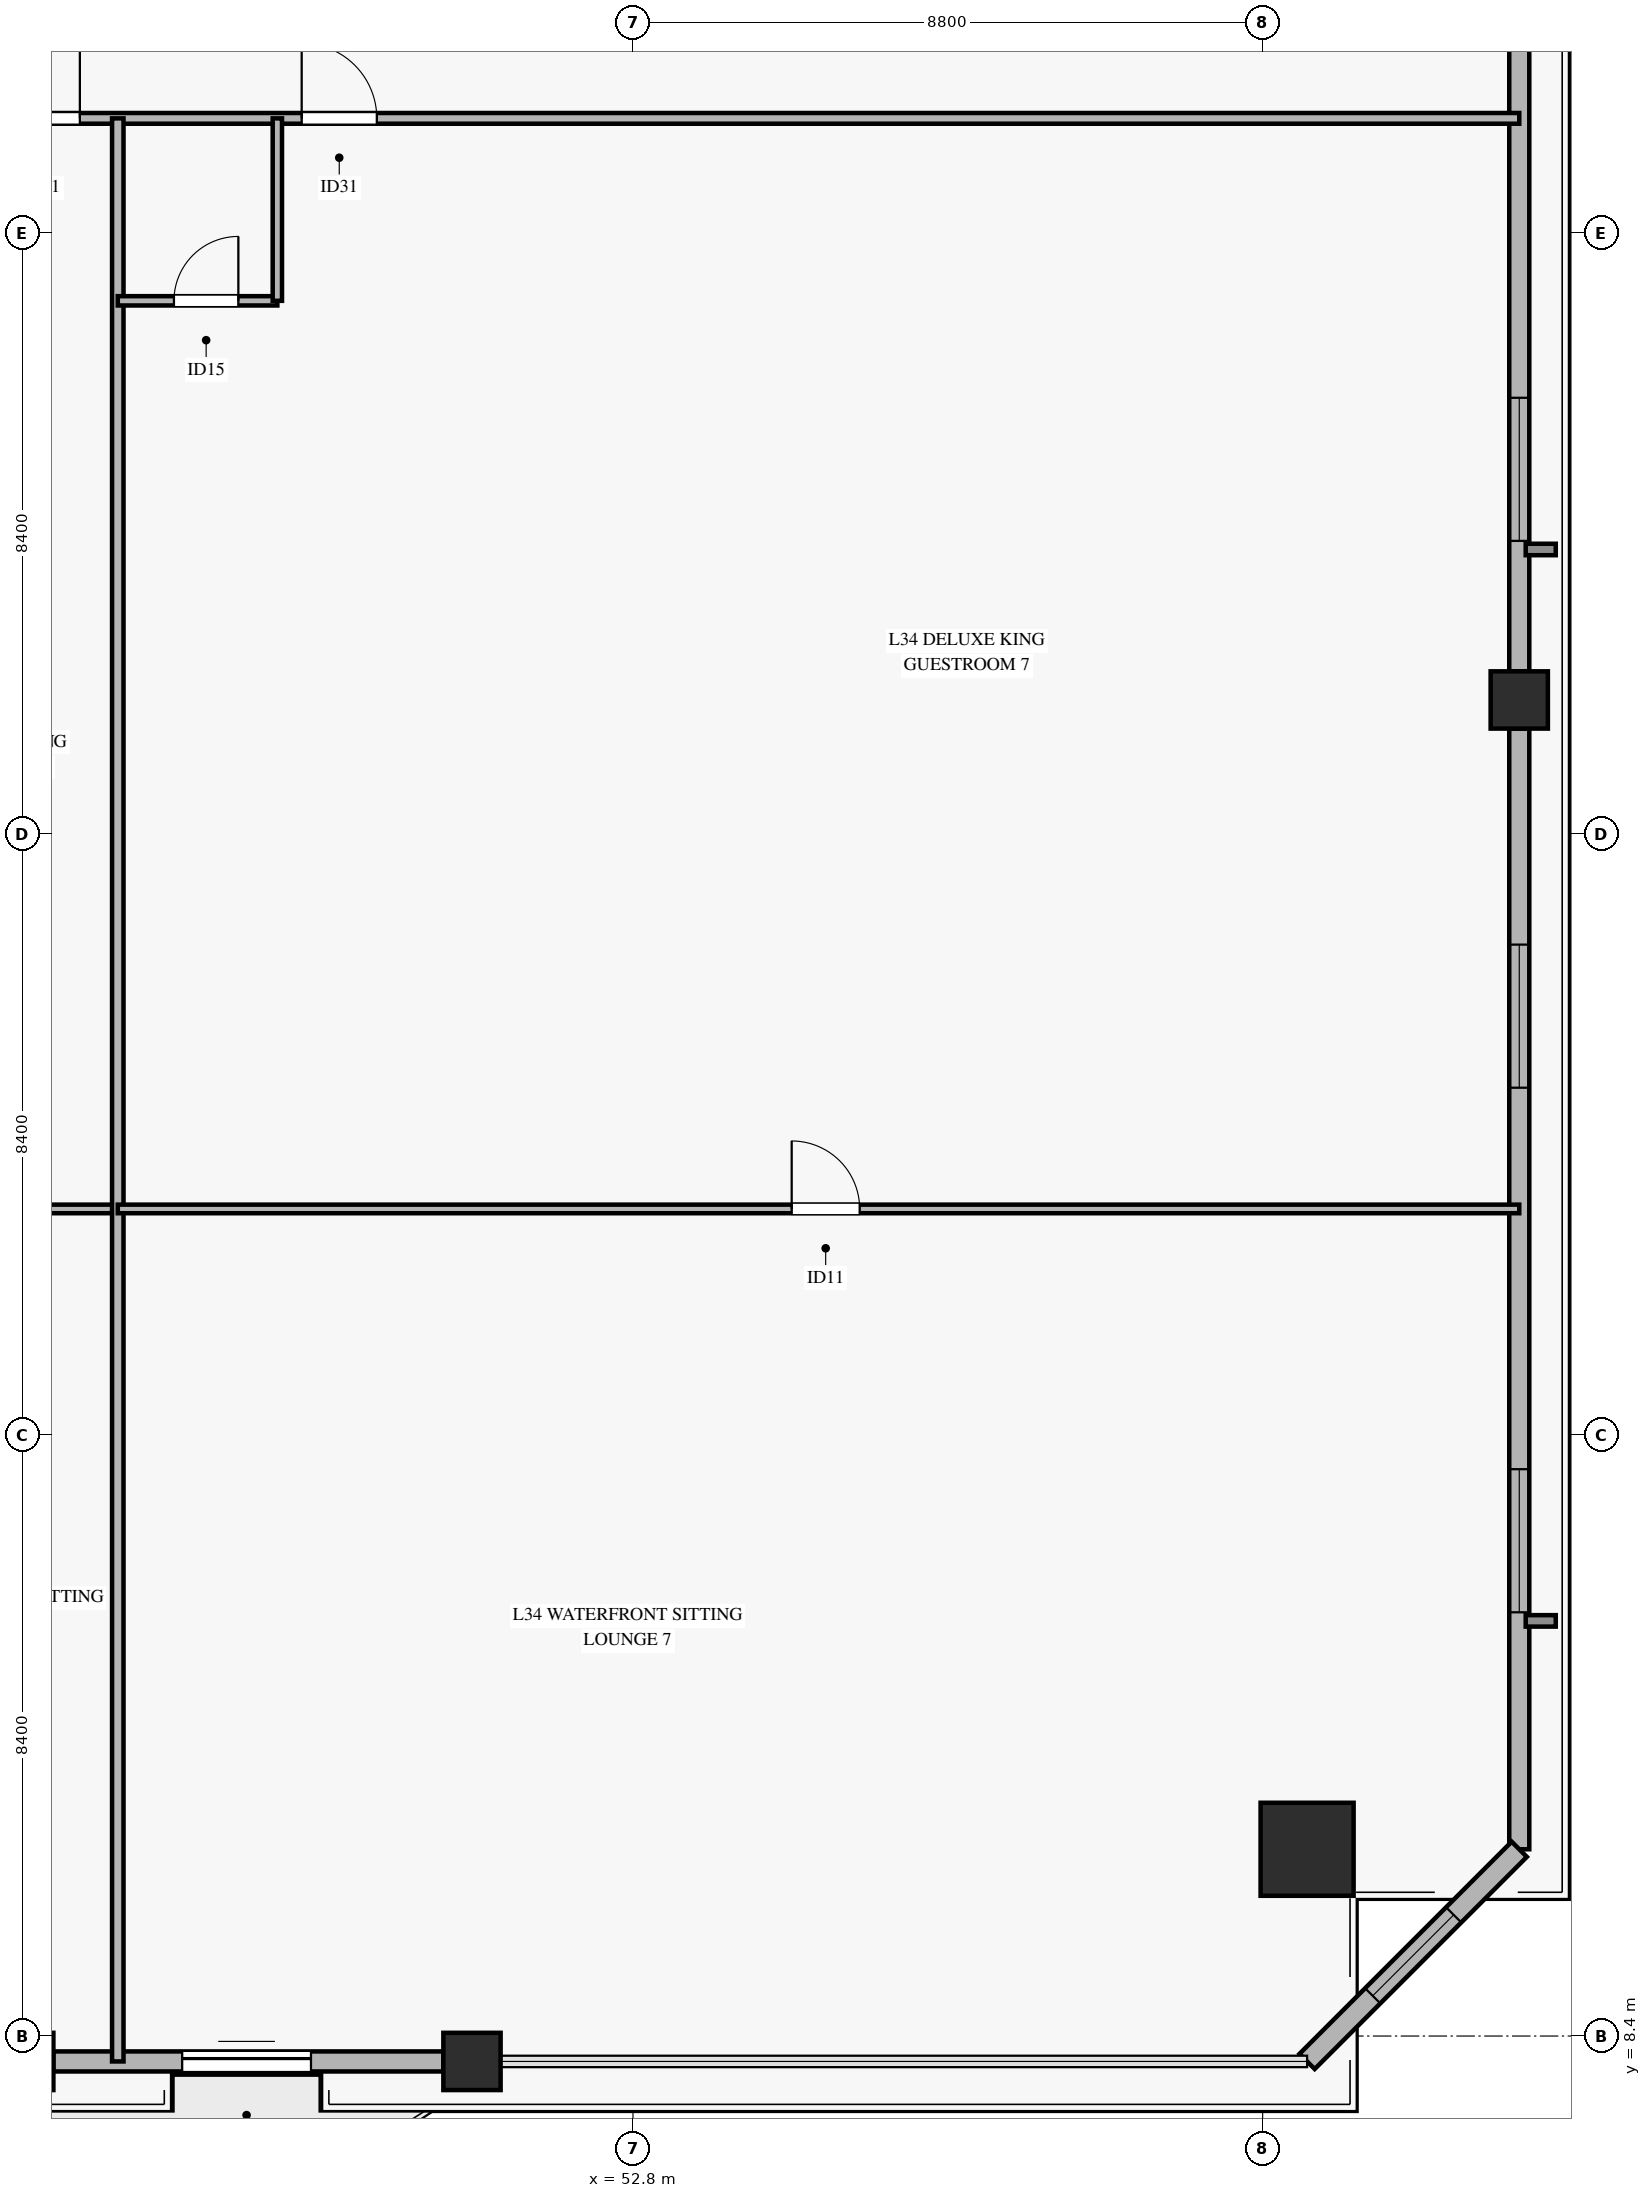
"""IFC4 building model, lengths in metres.
Left out: names, types, materials, properties, quantities, classifications, styles, units other than length and angle.
Written with IfcOpenShell. Run it as: python <this file> out.ifc"""

import sys

from ifc_helpers import new_model, si_unit, direction, frame, frame_2d, origin, origin_2d, place, context, subcontext, project, spatial, rectangle, hollow_rectangle, extrude, source, transform, mapped, element, fill, save


model = new_model("IFC4")
c1 = context("Model", 3, precision=1e-05, world=origin(), true_north=direction((0.0, 1.0)))
c2 = subcontext(c1, "Body", "Model", "MODEL_VIEW")
j1 = project(units=[si_unit("LENGTHUNIT", "METRE"), si_unit("PLANEANGLEUNIT", "RADIAN")], contexts=[c1])
p1 = place(None, origin())
s1 = spatial("IfcSite", under=j1, at=p1, CompositionType="ELEMENT")
p2 = place(p1, origin())
s2 = spatial("IfcBuilding", under=s1, at=p2, CompositionType="ELEMENT")
p3 = place(p2, frame((0.0, 0.0, 141.2)))
s3 = spatial("IfcBuildingStorey", under=s2, at=p3, CompositionType="ELEMENT", Elevation=141.2)
m1 = source(origin(), c2, "Body", "SweptSolid", [
    extrude(hollow_rectangle(XDim=1.3, YDim=1.3, WallThickness=0.06, at=origin_2d()), origin(), (0.0, 0.0, 1.0), 3.22),
])
p4 = place(p3, frame((62.221, 11.01, 0.0), z_axis=(0.0, 0.0, 1.0), x_axis=(1.0, 0.0, 0.0)))
e1 = element("IfcColumn", 1, at=p4, inside=s3, PredefinedType="COLUMN", context=c2, shape_type="MappedRepresentation", body=[
    mapped(m1, transform((0.0, 0.0, 0.0), x_axis=(1.0, 0.0, 0.0), y_axis=(0.0, 1.0, 0.0), z_axis=(0.0, 0.0, 1.0), scale=1.0)),
])
m2 = source(origin(), c2, "Body", "SweptSolid", [
    extrude(hollow_rectangle(XDim=0.8, YDim=0.8, WallThickness=0.036, at=origin_2d()), origin(), (0.0, 0.0, 1.0), 3.22),
])
for number, where, z_axis, x_axis in (
    (2, (44.3, 8.045, 0.0), (0.0, 0.0, 1.0), (1.0, 0.0, 0.0)),
    (3, (50.55, 8.045, 0.0), (0.0, 0.0, 1.0), (1.0, 0.0, 0.0)),
    (4, (65.186, 27.072, 0.0), (0.0, 0.0, 1.0), (1.0, 0.0, 0.0)),
):
    element("IfcColumn", number, at=place(p3, frame(where, z_axis=z_axis, x_axis=x_axis)), inside=s3, PredefinedType="COLUMN", context=c2, shape_type="MappedRepresentation", body=[
        mapped(m2, transform((0.0, 0.0, 0.0), x_axis=(1.0, 0.0, 0.0), y_axis=(0.0, 1.0, 0.0), z_axis=(0.0, 0.0, 1.0), scale=1.0)),
    ])
p5 = place(p3, frame((44.7, 8.045, 0.0), z_axis=(0.0, 0.0, 1.0), x_axis=(1.0, 0.0, 0.0)))
e5 = element("IfcWall", 5, at=p5, inside=s3, PredefinedType="SOLIDWALL", context=c2, shape_type="SweptSolid", body=[
    extrude(rectangle(XDim=5.45, YDim=0.28, at=frame_2d((2.725, 0.0))), origin(), (0.0, 0.0, 1.0), 2.7),
])
p6 = place(p5, frame((1.8, 0.0, 0.0)))
e6 = element("IfcOpeningElement", 6, at=p6, cuts=e5, PredefinedType="OPENING", context=c2, shape_type="SweptSolid", body=[
    extrude(rectangle(XDim=1.8, YDim=2.25, at=frame_2d((0.9, 1.125))), frame((0.0, 0.15, 0.0), z_axis=(0.0, -1.0, 0.0), x_axis=(1.0, 0.0, 0.0)), (0.0, 0.0, 1.0), 0.3),
])
p7 = place(p3, frame((65.186, 11.01, 0.0), z_axis=(0.0, 0.0, 1.0), x_axis=(0.0, 1.0, 0.0)))
e7 = element("IfcWall", 7, at=p7, inside=s3, PredefinedType="SOLIDWALL", context=c2, shape_type="SweptSolid", body=[
    extrude(rectangle(XDim=15.662, YDim=0.28, at=frame_2d((7.831, 0.0))), origin(), (0.0, 0.0, 1.0), 2.7),
])
p8 = place(p7, frame((3.312, 0.0, 0.45)))
e8 = element("IfcOpeningElement", 8, at=p8, cuts=e7, PredefinedType="OPENING", context=c2, shape_type="SweptSolid", body=[
    extrude(rectangle(XDim=2.0, YDim=2.0, at=frame_2d((1.0, 1.0))), frame((0.0, 0.15, 0.0), z_axis=(0.0, -1.0, 0.0), x_axis=(1.0, 0.0, 0.0)), (0.0, 0.0, 1.0), 0.3),
])
p9 = place(p7, frame((10.643, 0.0, 0.45)))
e9 = element("IfcOpeningElement", 9, at=p9, cuts=e7, PredefinedType="OPENING", context=c2, shape_type="SweptSolid", body=[
    extrude(rectangle(XDim=2.0, YDim=2.0, at=frame_2d((1.0, 1.0))), frame((0.0, 0.15, 0.0), z_axis=(0.0, -1.0, 0.0), x_axis=(1.0, 0.0, 0.0)), (0.0, 0.0, 1.0), 0.3),
])
p10 = place(p3, frame((65.186, 27.472, 0.0), z_axis=(0.0, 0.0, 1.0), x_axis=(0.0, 1.0, 0.0)))
e10 = element("IfcWall", 10, at=p10, inside=s3, PredefinedType="SOLIDWALL", context=c2, shape_type="SweptSolid", body=[
    extrude(rectangle(XDim=15.662, YDim=0.28, at=frame_2d((7.831, 0.0))), origin(), (0.0, 0.0, 1.0), 2.7),
])
p11 = place(p10, frame((1.823, 0.0, 0.45)))
e11 = element("IfcOpeningElement", 11, at=p11, cuts=e10, PredefinedType="OPENING", context=c2, shape_type="SweptSolid", body=[
    extrude(rectangle(XDim=2.0, YDim=2.0, at=frame_2d((1.0, 1.0))), frame((0.0, 0.15, 0.0), z_axis=(0.0, -1.0, 0.0), x_axis=(1.0, 0.0, 0.0)), (0.0, 0.0, 1.0), 0.3),
])
p12 = place(p10, frame((12.458, 0.0, 0.45)))
e12 = element("IfcOpeningElement", 12, at=p12, cuts=e10, PredefinedType="OPENING", context=c2, shape_type="SweptSolid", body=[
    extrude(rectangle(XDim=2.0, YDim=2.0, at=frame_2d((1.0, 1.0))), frame((0.0, 0.15, 0.0), z_axis=(0.0, -1.0, 0.0), x_axis=(1.0, 0.0, 0.0)), (0.0, 0.0, 1.0), 0.3),
])
p13 = place(p3, frame((62.221, 8.045, 0.0), z_axis=(0.0, 0.0, 1.0), x_axis=(0.707106781187, 0.707106781187, 0.0)))
e13 = element("IfcWall", 13, at=p13, inside=s3, PredefinedType="SOLIDWALL", context=c2, shape_type="SweptSolid", body=[
    extrude(rectangle(XDim=4.193, YDim=0.3, at=frame_2d((2.097, 0.0))), origin(), (0.0, 0.0, 1.0), 2.7),
])
p14 = place(p13, frame((1.297, 0.0, 0.45)))
e14 = element("IfcOpeningElement", 14, at=p14, cuts=e13, PredefinedType="OPENING", context=c2, shape_type="SweptSolid", body=[
    extrude(rectangle(XDim=1.6, YDim=2.0, at=frame_2d((0.8, 1.0))), frame((0.0, 0.16, 0.0), z_axis=(0.0, -1.0, 0.0), x_axis=(1.0, 0.0, 0.0)), (0.0, 0.0, 1.0), 0.32),
])
p15 = place(p3, frame((5.214, 35.2, 0.0), z_axis=(0.0, 0.0, 1.0), x_axis=(1.0, 0.0, 0.0)))
e15 = element("IfcWall", 15, at=p15, inside=s3, PredefinedType="PARTITIONING", context=c2, shape_type="SweptSolid", body=[
    extrude(rectangle(XDim=59.972, YDim=0.15, at=frame_2d((29.986, 0.0))), origin(), (0.0, 0.0, 1.0), 2.405),
])
p16 = place(p15, frame((2.77, 0.0, 0.0)))
e16 = element("IfcOpeningElement", 16, at=p16, cuts=e15, PredefinedType="OPENING", context=c2, shape_type="SweptSolid", body=[
    extrude(rectangle(XDim=1.05, YDim=2.15, at=frame_2d((0.525, 1.075))), frame((0.0, 0.085, 0.0), z_axis=(0.0, -1.0, 0.0), x_axis=(1.0, 0.0, 0.0)), (0.0, 0.0, 1.0), 0.17),
])
p17 = place(p15, frame((19.156, 0.0, 0.0)))
e17 = element("IfcOpeningElement", 17, at=p17, cuts=e15, PredefinedType="OPENING", context=c2, shape_type="SweptSolid", body=[
    extrude(rectangle(XDim=1.05, YDim=2.15, at=frame_2d((0.525, 1.075))), frame((0.0, 0.085, 0.0), z_axis=(0.0, -1.0, 0.0), x_axis=(1.0, 0.0, 0.0)), (0.0, 0.0, 1.0), 0.17),
])
p18 = place(p15, frame((24.662, 0.0, 0.0)))
e18 = element("IfcOpeningElement", 18, at=p18, cuts=e15, PredefinedType="OPENING", context=c2, shape_type="SweptSolid", body=[
    extrude(rectangle(XDim=1.05, YDim=2.15, at=frame_2d((0.525, 1.075))), frame((0.0, 0.085, 0.0), z_axis=(0.0, -1.0, 0.0), x_axis=(1.0, 0.0, 0.0)), (0.0, 0.0, 1.0), 0.17),
])
p19 = place(p15, frame((29.462, 0.0, 0.0)))
e19 = element("IfcOpeningElement", 19, at=p19, cuts=e15, PredefinedType="OPENING", context=c2, shape_type="SweptSolid", body=[
    extrude(rectangle(XDim=1.05, YDim=2.15, at=frame_2d((0.525, 1.075))), frame((0.0, 0.085, 0.0), z_axis=(0.0, -1.0, 0.0), x_axis=(1.0, 0.0, 0.0)), (0.0, 0.0, 1.0), 0.17),
])
p20 = place(p15, frame((34.262, 0.0, 0.0)))
e20 = element("IfcOpeningElement", 20, at=p20, cuts=e15, PredefinedType="OPENING", context=c2, shape_type="SweptSolid", body=[
    extrude(rectangle(XDim=1.05, YDim=2.15, at=frame_2d((0.525, 1.075))), frame((0.0, 0.085, 0.0), z_axis=(0.0, -1.0, 0.0), x_axis=(1.0, 0.0, 0.0)), (0.0, 0.0, 1.0), 0.17),
])
p21 = place(p15, frame((38.806, 0.0, 0.0)))
e21 = element("IfcOpeningElement", 21, at=p21, cuts=e15, PredefinedType="OPENING", context=c2, shape_type="SweptSolid", body=[
    extrude(rectangle(XDim=1.05, YDim=2.15, at=frame_2d((0.525, 1.075))), frame((0.0, 0.085, 0.0), z_axis=(0.0, -1.0, 0.0), x_axis=(1.0, 0.0, 0.0)), (0.0, 0.0, 1.0), 0.17),
])
p22 = place(p15, frame((42.956, 0.0, 0.0)))
e22 = element("IfcOpeningElement", 22, at=p22, cuts=e15, PredefinedType="OPENING", context=c2, shape_type="SweptSolid", body=[
    extrude(rectangle(XDim=1.05, YDim=2.15, at=frame_2d((0.525, 1.075))), frame((0.0, 0.085, 0.0), z_axis=(0.0, -1.0, 0.0), x_axis=(1.0, 0.0, 0.0)), (0.0, 0.0, 1.0), 0.17),
])
p23 = place(p3, frame((42.0, 19.959, 0.0), z_axis=(0.0, 0.0, 1.0), x_axis=(1.0, 0.0, 0.0)))
e23 = element("IfcWall", 23, at=p23, inside=s3, PredefinedType="PARTITIONING", context=c2, shape_type="SweptSolid", body=[
    extrude(rectangle(XDim=3.6, YDim=0.12, at=frame_2d((1.8, 0.0))), origin(), (0.0, 0.0, 1.0), 2.405),
])
p24 = place(p23, frame((1.525, 0.0, 0.0)))
e24 = element("IfcOpeningElement", 24, at=p24, cuts=e23, PredefinedType="OPENING", context=c2, shape_type="SweptSolid", body=[
    extrude(rectangle(XDim=0.95, YDim=2.1, at=frame_2d((0.475, 1.05))), frame((0.0, 0.07, 0.0), z_axis=(0.0, -1.0, 0.0), x_axis=(1.0, 0.0, 0.0)), (0.0, 0.0, 1.0), 0.14),
])
p25 = place(p3, frame((45.6, 8.045, 0.0), z_axis=(0.0, 0.0, 1.0), x_axis=(0.0, 1.0, 0.0)))
e25 = element("IfcWall", 25, at=p25, inside=s3, PredefinedType="PARTITIONING", context=c2, shape_type="SweptSolid", body=[
    extrude(rectangle(XDim=27.155, YDim=0.16, at=frame_2d((13.578, 0.0))), origin(), (0.0, 0.0, 1.0), 2.705),
])
p26 = place(p3, frame((45.6, 32.65, 0.0), z_axis=(0.0, 0.0, 1.0), x_axis=(1.0, 0.0, 0.0)))
e26 = element("IfcWall", 26, at=p26, inside=s3, PredefinedType="PARTITIONING", context=c2, shape_type="SweptSolid", body=[
    extrude(rectangle(XDim=2.23, YDim=0.13, at=frame_2d((1.115, 0.0))), origin(), (0.0, 0.0, 1.0), 2.755),
])
p27 = place(p26, frame((0.785, 0.0, 0.0)))
e27 = element("IfcOpeningElement", 27, at=p27, cuts=e26, PredefinedType="OPENING", context=c2, shape_type="SweptSolid", body=[
    extrude(rectangle(XDim=0.9, YDim=2.1, at=frame_2d((0.45, 1.05))), frame((0.0, 0.075, 0.0), z_axis=(0.0, -1.0, 0.0), x_axis=(1.0, 0.0, 0.0)), (0.0, 0.0, 1.0), 0.15),
])
p28 = place(p3, frame((47.83, 32.65, 0.0), z_axis=(0.0, 0.0, 1.0), x_axis=(0.0, 1.0, 0.0)))
e28 = element("IfcWall", 28, at=p28, inside=s3, PredefinedType="PARTITIONING", context=c2, shape_type="SweptSolid", body=[
    extrude(rectangle(XDim=2.55, YDim=0.13, at=frame_2d((1.275, 0.0))), origin(), (0.0, 0.0, 1.0), 3.22),
])
p29 = place(p3, frame((45.6, 19.959, 0.0), z_axis=(0.0, 0.0, 1.0), x_axis=(1.0, 0.0, 0.0)))
e29 = element("IfcWall", 29, at=p29, inside=s3, PredefinedType="PARTITIONING", context=c2, shape_type="SweptSolid", body=[
    extrude(rectangle(XDim=19.586, YDim=0.12, at=frame_2d((9.793, 0.0))), origin(), (0.0, 0.0, 1.0), 2.405),
])
p30 = place(p29, frame((9.418, 0.0, 0.0)))
e30 = element("IfcOpeningElement", 30, at=p30, cuts=e29, PredefinedType="OPENING", context=c2, shape_type="SweptSolid", body=[
    extrude(rectangle(XDim=0.95, YDim=2.1, at=frame_2d((0.475, 1.05))), frame((0.0, 0.07, 0.0), z_axis=(0.0, -1.0, 0.0), x_axis=(1.0, 0.0, 0.0)), (0.0, 0.0, 1.0), 0.14),
])
m3 = source(origin(), c2, "Body", "SweptSolid", [
    extrude(rectangle(XDim=1.8, YDim=2.25, at=frame_2d((0.9, 1.125))), frame((0.0, 0.025, 0.0), z_axis=(0.0, -1.0, 0.0), x_axis=(1.0, 0.0, 0.0)), (0.0, 0.0, 1.0), 0.05),
])
p31 = place(p6, origin())
e31 = element("IfcDoor", 31, at=p31, inside=s3, OperationType="SLIDING_TO_LEFT", PredefinedType="DOOR", context=c2, shape_type="MappedRepresentation", body=[
    mapped(m3, transform((0.0, 0.0, 0.0), x_axis=(1.0, 0.0, 0.0), y_axis=(0.0, 1.0, 0.0), z_axis=(0.0, 0.0, 1.0), scale=1.0)),
])
fill(e6, e31)
m4 = source(origin(), c2, "Body", "SweptSolid", [
    extrude(rectangle(XDim=2.0, YDim=2.0, at=frame_2d((1.0, 1.0))), frame((0.0, 0.03, 0.0), z_axis=(0.0, -1.0, 0.0), x_axis=(1.0, 0.0, 0.0)), (0.0, 0.0, 1.0), 0.06),
])
p32 = place(p8, origin())
e32 = element("IfcWindow", 32, at=p32, inside=s3, PartitioningType="SINGLE_PANEL", PredefinedType="WINDOW", context=c2, shape_type="MappedRepresentation", body=[
    mapped(m4, transform((0.0, 0.0, 0.0), x_axis=(1.0, 0.0, 0.0), y_axis=(0.0, 1.0, 0.0), z_axis=(0.0, 0.0, 1.0), scale=1.0)),
])
fill(e8, e32)
p33 = place(p9, origin())
e33 = element("IfcWindow", 33, at=p33, inside=s3, PartitioningType="SINGLE_PANEL", PredefinedType="WINDOW", context=c2, shape_type="MappedRepresentation", body=[
    mapped(m4, transform((0.0, 0.0, 0.0), x_axis=(1.0, 0.0, 0.0), y_axis=(0.0, 1.0, 0.0), z_axis=(0.0, 0.0, 1.0), scale=1.0)),
])
fill(e9, e33)
p34 = place(p11, origin())
e34 = element("IfcWindow", 34, at=p34, inside=s3, PartitioningType="SINGLE_PANEL", PredefinedType="WINDOW", context=c2, shape_type="MappedRepresentation", body=[
    mapped(m4, transform((0.0, 0.0, 0.0), x_axis=(1.0, 0.0, 0.0), y_axis=(0.0, 1.0, 0.0), z_axis=(0.0, 0.0, 1.0), scale=1.0)),
])
fill(e11, e34)
m5 = source(origin(), c2, "Body", "SweptSolid", [
    extrude(rectangle(XDim=1.6, YDim=2.0, at=frame_2d((0.8, 1.0))), frame((0.0, 0.03, 0.0), z_axis=(0.0, -1.0, 0.0), x_axis=(1.0, 0.0, 0.0)), (0.0, 0.0, 1.0), 0.06),
])
p35 = place(p14, origin())
e35 = element("IfcWindow", 35, at=p35, inside=s3, PartitioningType="SINGLE_PANEL", PredefinedType="WINDOW", context=c2, shape_type="MappedRepresentation", body=[
    mapped(m5, transform((0.0, 0.0, 0.0), x_axis=(1.0, 0.0, 0.0), y_axis=(0.0, 1.0, 0.0), z_axis=(0.0, 0.0, 1.0), scale=1.0)),
])
fill(e14, e35)
m6 = source(origin(), c2, "Body", "SweptSolid", [
    extrude(rectangle(XDim=1.05, YDim=2.15, at=frame_2d((0.525, 1.075))), frame((0.0, 0.025, 0.0), z_axis=(0.0, -1.0, 0.0), x_axis=(1.0, 0.0, 0.0)), (0.0, 0.0, 1.0), 0.05),
])
p36 = place(p21, origin())
e36 = element("IfcDoor", 36, at=p36, inside=s3, OperationType="SINGLE_SWING_RIGHT", PredefinedType="DOOR", context=c2, shape_type="MappedRepresentation", body=[
    mapped(m6, transform((0.0, 0.0, 0.0), x_axis=(1.0, 0.0, 0.0), y_axis=(0.0, 1.0, 0.0), z_axis=(0.0, 0.0, 1.0), scale=1.0)),
])
fill(e21, e36)
p37 = place(p22, origin())
e37 = element("IfcDoor", 37, at=p37, inside=s3, OperationType="SINGLE_SWING_LEFT", PredefinedType="DOOR", context=c2, shape_type="MappedRepresentation", body=[
    mapped(m6, transform((0.0, 0.0, 0.0), x_axis=(1.0, 0.0, 0.0), y_axis=(0.0, 1.0, 0.0), z_axis=(0.0, 0.0, 1.0), scale=1.0)),
])
fill(e22, e37)
m7 = source(origin(), c2, "Body", "SweptSolid", [
    extrude(rectangle(XDim=0.9, YDim=2.1, at=frame_2d((0.45, 1.05))), frame((0.0, 0.025, 0.0), z_axis=(0.0, -1.0, 0.0), x_axis=(1.0, 0.0, 0.0)), (0.0, 0.0, 1.0), 0.05),
])
p38 = place(p27, origin())
e38 = element("IfcDoor", 38, at=p38, inside=s3, OperationType="SINGLE_SWING_RIGHT", PredefinedType="DOOR", context=c2, shape_type="MappedRepresentation", body=[
    mapped(m7, transform((0.0, 0.0, 0.0), x_axis=(1.0, 0.0, 0.0), y_axis=(0.0, 1.0, 0.0), z_axis=(0.0, 0.0, 1.0), scale=1.0)),
])
fill(e27, e38)
m8 = source(origin(), c2, "Body", "SweptSolid", [
    extrude(rectangle(XDim=0.95, YDim=2.1, at=frame_2d((0.475, 1.05))), frame((0.0, 0.025, 0.0), z_axis=(0.0, -1.0, 0.0), x_axis=(1.0, 0.0, 0.0)), (0.0, 0.0, 1.0), 0.05),
])
p39 = place(p30, origin())
e39 = element("IfcDoor", 39, at=p39, inside=s3, OperationType="SINGLE_SWING_LEFT", PredefinedType="DOOR", context=c2, shape_type="MappedRepresentation", body=[
    mapped(m8, transform((0.0, 0.0, 0.0), x_axis=(1.0, 0.0, 0.0), y_axis=(0.0, 1.0, 0.0), z_axis=(0.0, 0.0, 1.0), scale=1.0)),
])
fill(e30, e39)
save(model, sys.argv[1])
